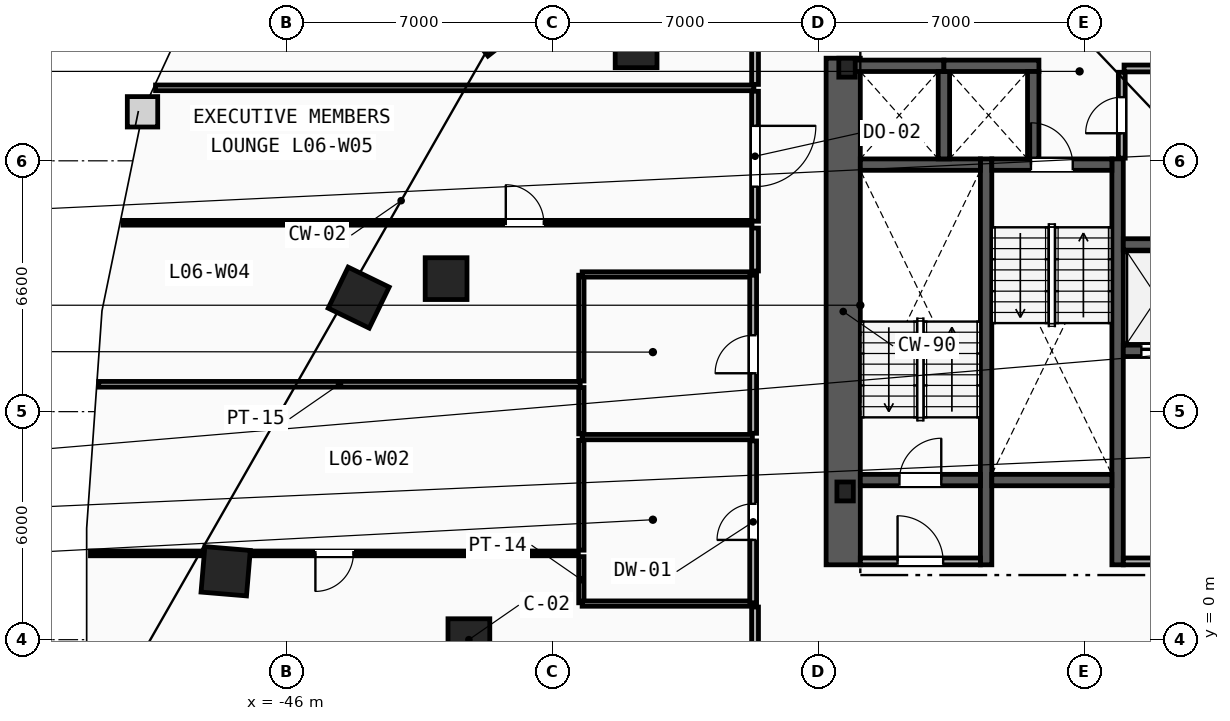
"""IFC4 building model, lengths in metres.
Left out: names, types, materials, properties, quantities, classifications, styles, units other than length and angle.
Written with IfcOpenShell. Run it as: python <this file> out.ifc"""

import sys

from ifc_helpers import new_model, si_unit, direction, frame, frame_2d, origin, origin_2d, place, context, subcontext, project, spatial, rectangle, i_section, extrude, element, fill, save


model = new_model("IFC4")
c1 = context("Model", 3, precision=1e-05, world=origin(), true_north=direction((0.0, 1.0)))
c2 = subcontext(c1, "Body", "Model", "MODEL_VIEW")
j1 = project(units=[si_unit("LENGTHUNIT", "METRE"), si_unit("PLANEANGLEUNIT", "RADIAN")], contexts=[c1])
p1 = place(None, origin())
s1 = spatial("IfcSite", under=j1, at=p1, CompositionType="ELEMENT")
p2 = place(p1, origin())
s2 = spatial("IfcBuilding", under=s1, at=p2, CompositionType="ELEMENT")
p3 = place(p2, frame((0.0, 0.0, 27.8)))
s3 = spatial("IfcBuildingStorey", under=s2, at=p3, CompositionType="ELEMENT", Elevation=27.8)
for number, where, z_axis, x_axis in (
    (1, (-31.3, 3.9, 0.0), (0.0, 0.0, 1.0), (1.0, 0.0, 0.0)),
    (2, (-31.25, 15.05, 0.0), (0.0, 0.0, 1.0), (1.0, 0.0, 0.0)),
):
    element("IfcColumn", number, at=place(p3, frame(where, z_axis=z_axis, x_axis=x_axis)), inside=s3, PredefinedType="COLUMN", context=c2, shape_type="SweptSolid", body=[
        extrude(i_section(OverallWidth=0.432, OverallDepth=0.498, WebThickness=0.056, FlangeThickness=0.089, FilletRadius=0.018, at=origin_2d()), origin(), (0.0, 0.0, 1.0), 3.8),
    ])
for number, where, z_axis, x_axis in (
    (3, (-41.2, 0.0, 0.0), (0.0, 0.0, 1.0), (1.0, 0.0, 0.0)),
    (4, (-41.8, 9.5, 0.0), (0.0, 0.0, 1.0), (1.0, 0.0, 0.0)),
    (5, (-36.8, 15.6, 0.0), (0.0, 0.0, 1.0), (1.0, 0.0, 0.0)),
):
    element("IfcColumn", number, at=place(p3, frame(where, z_axis=z_axis, x_axis=x_axis)), inside=s3, PredefinedType="COLUMN", context=c2, shape_type="SweptSolid", body=[
        extrude(rectangle(XDim=1.1, YDim=1.1, at=origin_2d()), origin(), (0.0, 0.0, 1.0), 3.8),
    ])
for number, where, z_axis, x_axis in (
    (6, (-40.6, 16.2, 0.0), (0.0, 0.0, 1.0), (-0.785, -0.619, 0.0)),
    (7, (-44.1, 9.0, 0.0), (0.0, 0.0, 1.0), (-0.437, -0.899, 0.0)),
    (8, (-47.6, 1.8, 0.0), (0.0, 0.0, 1.0), (-0.084, -0.997, 0.0)),
):
    element("IfcColumn", number, at=place(p3, frame(where, z_axis=z_axis, x_axis=x_axis)), inside=s3, PredefinedType="COLUMN", context=c2, shape_type="SweptSolid", body=[
        extrude(rectangle(XDim=1.2, YDim=1.2, at=origin_2d()), origin(), (0.0, 0.0, 1.0), 3.8),
    ])
p4 = place(p3, frame((-31.35, 1.97, 0.0), z_axis=(0.0, 0.0, 1.0), x_axis=(0.0, 1.0, 0.0)))
e9 = element("IfcWall", 9, at=p4, inside=s3, PredefinedType="SHEAR", context=c2, shape_type="SweptSolid", body=[
    extrude(rectangle(XDim=13.33, YDim=0.9, at=frame_2d((6.665, 0.0))), origin(), (0.0, 0.0, 1.0), 3.5),
])
for number, where, z_axis, x_axis in (
    (10, (-27.59, 1.97, 0.0), (0.0, 0.0, 1.0), (0.0, 1.0, 0.0)),
    (11, (-24.13, 1.97, 0.0), (0.0, 0.0, 1.0), (0.0, 1.0, 0.0)),
):
    element("IfcWall", number, at=place(p3, frame(where, z_axis=z_axis, x_axis=x_axis)), inside=s3, PredefinedType="SHEAR", context=c2, shape_type="SweptSolid", body=[
        extrude(rectangle(XDim=10.68, YDim=0.3, at=frame_2d((5.34, 0.0))), origin(), (0.0, 0.0, 1.0), 3.5),
    ])
p5 = place(p3, frame((-30.9, 4.2, 0.0), z_axis=(0.0, 0.0, 1.0), x_axis=(1.0, 0.0, 0.0)))
e12 = element("IfcWall", 12, at=p5, inside=s3, PredefinedType="SHEAR", context=c2, shape_type="SweptSolid", body=[
    extrude(rectangle(XDim=3.16, YDim=0.3, at=frame_2d((1.58, 0.0))), origin(), (0.0, 0.0, 1.0), 3.5),
])
p6 = place(p5, frame((1.03, 0.0, 0.0)))
e13 = element("IfcOpeningElement", 13, at=p6, cuts=e12, PredefinedType="OPENING", context=c2, shape_type="SweptSolid", body=[
    extrude(rectangle(XDim=1.1, YDim=2.15, at=frame_2d((0.55, 1.075))), frame((0.0, 0.16, 0.0), z_axis=(0.0, -1.0, 0.0), x_axis=(1.0, 0.0, 0.0)), (0.0, 0.0, 1.0), 0.32),
])
p7 = place(p3, frame((-30.9, 12.5, 0.0), z_axis=(0.0, 0.0, 1.0), x_axis=(1.0, 0.0, 0.0)))
e14 = element("IfcWall", 14, at=p7, inside=s3, PredefinedType="SHEAR", context=c2, shape_type="SweptSolid", body=[
    extrude(rectangle(XDim=3.16, YDim=0.3, at=frame_2d((1.58, 0.0))), origin(), (0.0, 0.0, 1.0), 3.5),
])
p8 = place(p3, frame((-27.44, 12.5, 0.0), z_axis=(0.0, 0.0, 1.0), x_axis=(1.0, 0.0, 0.0)))
e15 = element("IfcWall", 15, at=p8, inside=s3, PredefinedType="SHEAR", context=c2, shape_type="SweptSolid", body=[
    extrude(rectangle(XDim=3.16, YDim=0.3, at=frame_2d((1.58, 0.0))), origin(), (0.0, 0.0, 1.0), 3.5),
])
p9 = place(p8, frame((1.03, 0.0, 0.0)))
e16 = element("IfcOpeningElement", 16, at=p9, cuts=e15, PredefinedType="OPENING", context=c2, shape_type="SweptSolid", body=[
    extrude(rectangle(XDim=1.1, YDim=2.15, at=frame_2d((0.55, 1.075))), frame((0.0, 0.16, 0.0), z_axis=(0.0, -1.0, 0.0), x_axis=(1.0, 0.0, 0.0)), (0.0, 0.0, 1.0), 0.32),
])
p10 = place(p3, frame((-27.44, 4.2, 0.0), z_axis=(0.0, 0.0, 1.0), x_axis=(1.0, 0.0, 0.0)))
e17 = element("IfcWall", 17, at=p10, inside=s3, PredefinedType="SHEAR", context=c2, shape_type="SweptSolid", body=[
    extrude(rectangle(XDim=3.16, YDim=0.3, at=frame_2d((1.58, 0.0))), origin(), (0.0, 0.0, 1.0), 3.5),
])
p11 = place(p3, frame((-23.98, 2.06, 0.0), z_axis=(0.0, 0.0, 1.0), x_axis=(1.0, 0.0, 0.0)))
e18 = element("IfcWall", 18, at=p11, inside=s3, PredefinedType="PARTITIONING", context=c2, shape_type="SweptSolid", body=[
    extrude(rectangle(XDim=3.0, YDim=0.18, at=frame_2d((1.5, 0.0))), origin(), (0.0, 0.0, 1.0), 3.5),
])
p12 = place(p11, frame((0.9, 0.0, 0.0)))
e19 = element("IfcOpeningElement", 19, at=p12, cuts=e18, PredefinedType="OPENING", context=c2, shape_type="SweptSolid", body=[
    extrude(rectangle(XDim=1.2, YDim=2.15, at=frame_2d((0.6, 1.075))), frame((0.0, 0.1, 0.0), z_axis=(0.0, -1.0, 0.0), x_axis=(1.0, 0.0, 0.0)), (0.0, 0.0, 1.0), 0.2),
])
p13 = place(p3, frame((-30.9, 2.06, 0.0), z_axis=(0.0, 0.0, 1.0), x_axis=(1.0, 0.0, 0.0)))
e20 = element("IfcWall", 20, at=p13, inside=s3, PredefinedType="PARTITIONING", context=c2, shape_type="SweptSolid", body=[
    extrude(rectangle(XDim=3.16, YDim=0.18, at=frame_2d((1.58, 0.0))), origin(), (0.0, 0.0, 1.0), 3.5),
])
p14 = place(p13, frame((0.98, 0.0, 0.0)))
e21 = element("IfcOpeningElement", 21, at=p14, cuts=e20, PredefinedType="OPENING", context=c2, shape_type="SweptSolid", body=[
    extrude(rectangle(XDim=1.2, YDim=2.15, at=frame_2d((0.6, 1.075))), frame((0.0, 0.1, 0.0), z_axis=(0.0, -1.0, 0.0), x_axis=(1.0, 0.0, 0.0)), (0.0, 0.0, 1.0), 0.2),
])
p15 = place(p3, frame((-23.98, 7.6, 0.0), z_axis=(0.0, 0.0, 1.0), x_axis=(1.0, 0.0, 0.0)))
e22 = element("IfcWall", 22, at=p15, inside=s3, PredefinedType="SHEAR", context=c2, shape_type="SweptSolid", body=[
    extrude(rectangle(XDim=2.1, YDim=0.3, at=frame_2d((1.05, 0.0))), origin(), (0.0, 0.0, 1.0), 3.5),
])
p16 = place(p15, frame((0.475, 0.0, 0.0)))
e23 = element("IfcOpeningElement", 23, at=p16, cuts=e22, PredefinedType="OPENING", context=c2, shape_type="SweptSolid", body=[
    extrude(rectangle(XDim=1.15, YDim=2.2, at=frame_2d((0.575, 1.1))), frame((0.0, 0.16, 0.0), z_axis=(0.0, -1.0, 0.0), x_axis=(1.0, 0.0, 0.0)), (0.0, 0.0, 1.0), 0.32),
])
p17 = place(p3, frame((-23.98, 10.4, 0.0), z_axis=(0.0, 0.0, 1.0), x_axis=(1.0, 0.0, 0.0)))
e24 = element("IfcWall", 24, at=p17, inside=s3, PredefinedType="SHEAR", context=c2, shape_type="SweptSolid", body=[
    extrude(rectangle(XDim=2.1, YDim=0.3, at=frame_2d((1.05, 0.0))), origin(), (0.0, 0.0, 1.0), 3.5),
])
p18 = place(p3, frame((-31.2, 15.1, 0.0), z_axis=(0.0, 0.0, 1.0), x_axis=(1.0, 0.0, 0.0)))
e25 = element("IfcWall", 25, at=p18, inside=s3, PredefinedType="SHEAR", context=c2, shape_type="SweptSolid", body=[
    extrude(rectangle(XDim=2.5, YDim=0.3, at=frame_2d((1.25, 0.0))), origin(), (0.0, 0.0, 1.0), 3.5),
])
p19 = place(p3, frame((-28.7, 12.65, 0.0), z_axis=(0.0, 0.0, 1.0), x_axis=(0.0, 1.0, 0.0)))
e26 = element("IfcWall", 26, at=p19, inside=s3, PredefinedType="SHEAR", context=c2, shape_type="SweptSolid", body=[
    extrude(rectangle(XDim=2.3, YDim=0.3, at=frame_2d((1.15, 0.0))), origin(), (0.0, 0.0, 1.0), 3.5),
])
p20 = place(p3, frame((-28.7, 15.1, 0.0), z_axis=(0.0, 0.0, 1.0), x_axis=(1.0, 0.0, 0.0)))
e27 = element("IfcWall", 27, at=p20, inside=s3, PredefinedType="SHEAR", context=c2, shape_type="SweptSolid", body=[
    extrude(rectangle(XDim=2.5, YDim=0.3, at=frame_2d((1.25, 0.0))), origin(), (0.0, 0.0, 1.0), 3.5),
])
p21 = place(p3, frame((-26.35, 12.65, 0.0), z_axis=(0.0, 0.0, 1.0), x_axis=(0.0, 1.0, 0.0)))
e28 = element("IfcWall", 28, at=p21, inside=s3, PredefinedType="SHEAR", context=c2, shape_type="SweptSolid", body=[
    extrude(rectangle(XDim=2.3, YDim=0.3, at=frame_2d((1.15, 0.0))), origin(), (0.0, 0.0, 1.0), 3.5),
])
p22 = place(p3, frame((-23.96, 15.03, 0.0), z_axis=(0.0, 0.0, 1.0), x_axis=(1.0, 0.0, 0.0)))
e29 = element("IfcWall", 29, at=p22, inside=s3, PredefinedType="PARTITIONING", context=c2, shape_type="SweptSolid", body=[
    extrude(rectangle(XDim=2.61, YDim=0.18, at=frame_2d((1.305, 0.0))), origin(), (0.0, 0.0, 1.0), 2.573),
])
p23 = place(p3, frame((-24.02, 12.67, 0.0), z_axis=(0.0, 0.0, 1.0), x_axis=(0.0, 1.0, 0.0)))
e30 = element("IfcWall", 30, at=p23, inside=s3, PredefinedType="PARTITIONING", context=c2, shape_type="SweptSolid", body=[
    extrude(rectangle(XDim=2.26, YDim=0.18, at=frame_2d((1.13, 0.0))), origin(), (0.0, 0.0, 1.0), 3.5),
])
p24 = place(p23, frame((0.655, 0.0, 0.0)))
e31 = element("IfcOpeningElement", 31, at=p24, cuts=e30, PredefinedType="OPENING", context=c2, shape_type="SweptSolid", body=[
    extrude(rectangle(XDim=0.95, YDim=2.1, at=frame_2d((0.475, 1.05))), frame((0.0, 0.1, 0.0), z_axis=(0.0, -1.0, 0.0), x_axis=(1.0, 0.0, 0.0)), (0.0, 0.0, 1.0), 0.2),
])
p25 = place(p3, frame((-38.24, 0.97, 0.0), z_axis=(0.0, 0.0, 1.0), x_axis=(0.0, 1.0, 0.0)))
e32 = element("IfcWall", 32, at=p25, inside=s3, PredefinedType="PARTITIONING", context=c2, shape_type="SweptSolid", body=[
    extrude(rectangle(XDim=1.215, YDim=0.14, at=frame_2d((0.607, 0.0))), origin(), (0.0, 0.0, 1.0), 3.5),
])
p26 = place(p3, frame((-38.24, 2.355, 0.0), z_axis=(0.0, 0.0, 1.0), x_axis=(0.0, 1.0, 0.0)))
e33 = element("IfcWall", 33, at=p26, inside=s3, PredefinedType="PARTITIONING", context=c2, shape_type="SweptSolid", body=[
    extrude(rectangle(XDim=2.89, YDim=0.14, at=frame_2d((1.445, 0.0))), origin(), (0.0, 0.0, 1.0), 3.5),
])
p27 = place(p3, frame((-38.24, 5.415, 0.0), z_axis=(0.0, 0.0, 1.0), x_axis=(0.0, 1.0, 0.0)))
e34 = element("IfcWall", 34, at=p27, inside=s3, PredefinedType="PARTITIONING", context=c2, shape_type="SweptSolid", body=[
    extrude(rectangle(XDim=1.22, YDim=0.14, at=frame_2d((0.61, 0.0))), origin(), (0.0, 0.0, 1.0), 3.5),
])
p28 = place(p3, frame((-38.24, 6.805, 0.0), z_axis=(0.0, 0.0, 1.0), x_axis=(0.0, 1.0, 0.0)))
e35 = element("IfcWall", 35, at=p28, inside=s3, PredefinedType="PARTITIONING", context=c2, shape_type="SweptSolid", body=[
    extrude(rectangle(XDim=2.785, YDim=0.14, at=frame_2d((1.393, 0.0))), origin(), (0.0, 0.0, 1.0), 3.5),
])
for number, where, z_axis, x_axis in (
    (36, (-38.22, 0.95, 0.0), (0.0, 0.0, 1.0), (1.0, 0.0, 0.0)),
    (37, (-38.22, 5.33, 0.0), (0.0, 0.0, 1.0), (1.0, 0.0, 0.0)),
    (38, (-38.22, 9.61, 0.0), (0.0, 0.0, 1.0), (1.0, 0.0, 0.0)),
):
    element("IfcWall", number, at=place(p3, frame(where, z_axis=z_axis, x_axis=x_axis)), inside=s3, PredefinedType="PARTITIONING", context=c2, shape_type="SweptSolid", body=[
        extrude(rectangle(XDim=4.48, YDim=0.14, at=frame_2d((2.24, 0.0))), origin(), (0.0, 0.0, 1.0), 3.5),
    ])
p29 = place(p3, frame((-33.72, 0.97, 0.0), z_axis=(0.0, 0.0, 1.0), x_axis=(0.0, 1.0, 0.0)))
e39 = element("IfcWall", 39, at=p29, inside=s3, PredefinedType="PARTITIONING", context=c2, shape_type="SweptSolid", body=[
    extrude(rectangle(XDim=4.26, YDim=0.18, at=frame_2d((2.13, 0.0))), origin(), (0.0, 0.0, 1.0), 3.5),
])
p30 = place(p29, frame((1.655, 0.0, 0.0)))
e40 = element("IfcOpeningElement", 40, at=p30, cuts=e39, PredefinedType="OPENING", context=c2, shape_type="SweptSolid", body=[
    extrude(rectangle(XDim=0.95, YDim=2.1, at=frame_2d((0.475, 1.05))), frame((0.0, 0.1, 0.0), z_axis=(0.0, -1.0, 0.0), x_axis=(1.0, 0.0, 0.0)), (0.0, 0.0, 1.0), 0.2),
])
p31 = place(p3, frame((-33.72, 5.43, 0.0), z_axis=(0.0, 0.0, 1.0), x_axis=(0.0, 1.0, 0.0)))
e41 = element("IfcWall", 41, at=p31, inside=s3, PredefinedType="PARTITIONING", context=c2, shape_type="SweptSolid", body=[
    extrude(rectangle(XDim=4.16, YDim=0.18, at=frame_2d((2.08, 0.0))), origin(), (0.0, 0.0, 1.0), 3.5),
])
p32 = place(p31, frame((1.58, 0.0, 0.0)))
e42 = element("IfcOpeningElement", 42, at=p32, cuts=e41, PredefinedType="OPENING", context=c2, shape_type="SweptSolid", body=[
    extrude(rectangle(XDim=1.0, YDim=2.15, at=frame_2d((0.5, 1.075))), frame((0.0, 0.1, 0.0), z_axis=(0.0, -1.0, 0.0), x_axis=(1.0, 0.0, 0.0)), (0.0, 0.0, 1.0), 0.2),
])
p33 = place(p3, frame((-50.941, 6.72, 0.0), z_axis=(0.0, 0.0, 1.0), x_axis=(1.0, 0.0, 0.0)))
e43 = element("IfcWall", 43, at=p33, inside=s3, PredefinedType="PARTITIONING", context=c2, shape_type="SweptSolid", body=[
    extrude(rectangle(XDim=12.671, YDim=0.15, at=frame_2d((6.335, 0.0))), origin(), (0.0, 0.0, 1.0), 3.5),
])
p34 = place(p3, frame((-49.445, 14.52, 0.0), z_axis=(0.0, 0.0, 1.0), x_axis=(1.0, 0.0, 0.0)))
e44 = element("IfcWall", 44, at=p34, inside=s3, PredefinedType="PARTITIONING", context=c2, shape_type="SweptSolid", body=[
    extrude(rectangle(XDim=15.745, YDim=0.15, at=frame_2d((7.873, 0.0))), origin(), (0.0, 0.0, 1.0), 3.5),
])
p35 = place(p3, frame((-33.67, 0.859, 0.0), z_axis=(0.0, 0.0, 1.0), x_axis=(0.0, -1.0, 0.0)))
e45 = element("IfcWall", 45, at=p35, inside=s3, PredefinedType="PARTITIONING", context=c2, shape_type="SweptSolid", body=[
    extrude(rectangle(XDim=12.259, YDim=0.18, at=frame_2d((6.129, 0.0))), origin(), (0.0, 0.0, 1.0), 3.5),
])
p36 = place(p3, frame((-33.67, 17.428, 0.0), z_axis=(0.0, 0.0, 1.0), x_axis=(0.0, -1.0, 0.0)))
e46 = element("IfcWall", 46, at=p36, inside=s3, PredefinedType="PARTITIONING", context=c2, shape_type="SweptSolid", body=[
    extrude(rectangle(XDim=2.818, YDim=0.18, at=frame_2d((1.409, 0.0))), origin(), (0.0, 0.0, 1.0), 3.5),
])
p37 = place(p3, frame((-33.67, 10.83, 0.0), z_axis=(0.0, 0.0, 1.0), x_axis=(0.0, -1.0, 0.0)))
e47 = element("IfcWall", 47, at=p37, inside=s3, PredefinedType="PARTITIONING", context=c2, shape_type="SweptSolid", body=[
    extrude(rectangle(XDim=1.129, YDim=0.18, at=frame_2d((0.564, 0.0))), origin(), (0.0, 0.0, 1.0), 3.5),
])
p38 = place(p3, frame((-33.67, 14.43, 0.0), z_axis=(0.0, 0.0, 1.0), x_axis=(0.0, -1.0, 0.0)))
e48 = element("IfcWall", 48, at=p38, inside=s3, PredefinedType="PARTITIONING", context=c2, shape_type="SweptSolid", body=[
    extrude(rectangle(XDim=3.42, YDim=0.18, at=frame_2d((1.71, 0.0))), origin(), (0.0, 0.0, 1.0), 3.5),
])
p39 = place(p38, frame((0.91, 0.0, 0.0)))
e49 = element("IfcOpeningElement", 49, at=p39, cuts=e48, PredefinedType="OPENING", context=c2, shape_type="SweptSolid", body=[
    extrude(rectangle(XDim=1.6, YDim=2.2, at=frame_2d((0.8, 1.1))), frame((0.0, 0.1, 0.0), z_axis=(0.0, -1.0, 0.0), x_axis=(1.0, 0.0, 0.0)), (0.0, 0.0, 1.0), 0.2),
])
p40 = place(p3, frame((-38.32, 2.27, 0.0), z_axis=(0.0, 0.0, 1.0), x_axis=(-1.0, 0.0, 0.0)))
e50 = element("IfcWall", 50, at=p40, inside=s3, PredefinedType="PARTITIONING", context=c2, shape_type="SweptSolid", body=[
    extrude(rectangle(XDim=12.838, YDim=0.125, at=frame_2d((6.419, 0.0))), origin(), (0.0, 0.0, 1.0), 3.5),
])
p41 = place(p40, frame((5.919, 0.0, 0.0)))
e51 = element("IfcOpeningElement", 51, at=p41, cuts=e50, PredefinedType="OPENING", context=c2, shape_type="SweptSolid", body=[
    extrude(rectangle(XDim=1.0, YDim=2.15, at=frame_2d((0.5, 1.075))), frame((0.0, 0.073, 0.0), z_axis=(0.0, -1.0, 0.0), x_axis=(1.0, 0.0, 0.0)), (0.0, 0.0, 1.0), 0.145),
])
p42 = place(p3, frame((-50.302, 10.97, 0.0), z_axis=(0.0, 0.0, 1.0), x_axis=(1.0, 0.0, 0.0)))
e52 = element("IfcWall", 52, at=p42, inside=s3, PredefinedType="PARTITIONING", context=c2, shape_type="SweptSolid", body=[
    extrude(rectangle(XDim=16.552, YDim=0.125, at=frame_2d((8.276, 0.0))), origin(), (0.0, 0.0, 1.0), 3.5),
])
p43 = place(p42, frame((10.073, 0.0, 0.0)))
e53 = element("IfcOpeningElement", 53, at=p43, cuts=e52, PredefinedType="OPENING", context=c2, shape_type="SweptSolid", body=[
    extrude(rectangle(XDim=1.0, YDim=2.15, at=frame_2d((0.5, 1.075))), frame((0.0, 0.073, 0.0), z_axis=(0.0, -1.0, 0.0), x_axis=(1.0, 0.0, 0.0)), (0.0, 0.0, 1.0), 0.145),
])
p44 = place(p6, origin())
e54 = element("IfcDoor", 54, at=p44, inside=s3, OperationType="SINGLE_SWING_RIGHT", PredefinedType="DOOR", context=c2, shape_type="SweptSolid", body=[
    extrude(rectangle(XDim=1.1, YDim=2.15, at=frame_2d((0.55, 1.075))), frame((0.0, 0.025, 0.0), z_axis=(0.0, -1.0, 0.0), x_axis=(1.0, 0.0, 0.0)), (0.0, 0.0, 1.0), 0.05),
])
fill(e13, e54)
p45 = place(p9, origin())
e55 = element("IfcDoor", 55, at=p45, inside=s3, OperationType="SINGLE_SWING_LEFT", PredefinedType="DOOR", context=c2, shape_type="SweptSolid", body=[
    extrude(rectangle(XDim=1.1, YDim=2.15, at=frame_2d((0.55, 1.075))), frame((0.0, 0.025, 0.0), z_axis=(0.0, -1.0, 0.0), x_axis=(1.0, 0.0, 0.0)), (0.0, 0.0, 1.0), 0.05),
])
fill(e16, e55)
p46 = place(p14, origin())
e56 = element("IfcDoor", 56, at=p46, inside=s3, OperationType="SINGLE_SWING_LEFT", PredefinedType="DOOR", context=c2, shape_type="SweptSolid", body=[
    extrude(rectangle(XDim=1.2, YDim=2.15, at=frame_2d((0.6, 1.075))), frame((0.0, 0.025, 0.0), z_axis=(0.0, -1.0, 0.0), x_axis=(1.0, 0.0, 0.0)), (0.0, 0.0, 1.0), 0.05),
])
fill(e21, e56)
p47 = place(p16, origin())
e57 = element("IfcDoor", 57, at=p47, inside=s3, OperationType="SLIDING_TO_LEFT", PredefinedType="TRAPDOOR", context=c2, shape_type="SweptSolid", body=[
    extrude(rectangle(XDim=1.15, YDim=2.2, at=frame_2d((0.575, 1.1))), frame((0.0, 0.025, 0.0), z_axis=(0.0, -1.0, 0.0), x_axis=(1.0, 0.0, 0.0)), (0.0, 0.0, 1.0), 0.05),
])
fill(e23, e57)
p48 = place(p43, origin())
e58 = element("IfcDoor", 58, at=p48, inside=s3, OperationType="SINGLE_SWING_LEFT", PredefinedType="DOOR", context=c2, shape_type="SweptSolid", body=[
    extrude(rectangle(XDim=1.0, YDim=2.15, at=frame_2d((0.5, 1.075))), frame((0.0, 0.025, 0.0), z_axis=(0.0, -1.0, 0.0), x_axis=(1.0, 0.0, 0.0)), (0.0, 0.0, 1.0), 0.05),
])
fill(e53, e58)
p49 = place(p41, origin())
e59 = element("IfcDoor", 59, at=p49, inside=s3, OperationType="SINGLE_SWING_RIGHT", PredefinedType="DOOR", context=c2, shape_type="SweptSolid", body=[
    extrude(rectangle(XDim=1.0, YDim=2.15, at=frame_2d((0.5, 1.075))), frame((0.0, 0.025, 0.0), z_axis=(0.0, -1.0, 0.0), x_axis=(1.0, 0.0, 0.0)), (0.0, 0.0, 1.0), 0.05),
])
fill(e51, e59)
p50 = place(p30, origin())
e60 = element("IfcDoor", 60, at=p50, inside=s3, OperationType="SINGLE_SWING_LEFT", PredefinedType="DOOR", context=c2, shape_type="SweptSolid", body=[
    extrude(rectangle(XDim=0.95, YDim=2.1, at=frame_2d((0.475, 1.05))), frame((0.0, 0.025, 0.0), z_axis=(0.0, -1.0, 0.0), x_axis=(1.0, 0.0, 0.0)), (0.0, 0.0, 1.0), 0.05),
])
fill(e40, e60)
p51 = place(p32, origin())
e61 = element("IfcDoor", 61, at=p51, inside=s3, OperationType="SINGLE_SWING_LEFT", PredefinedType="DOOR", context=c2, shape_type="SweptSolid", body=[
    extrude(rectangle(XDim=1.0, YDim=2.15, at=frame_2d((0.5, 1.075))), frame((0.0, 0.025, 0.0), z_axis=(0.0, -1.0, 0.0), x_axis=(1.0, 0.0, 0.0)), (0.0, 0.0, 1.0), 0.05),
])
fill(e42, e61)
p52 = place(p39, origin())
e62 = element("IfcDoor", 62, at=p52, inside=s3, OperationType="SINGLE_SWING_LEFT", PredefinedType="DOOR", context=c2, shape_type="SweptSolid", body=[
    extrude(rectangle(XDim=1.6, YDim=2.2, at=frame_2d((0.8, 1.1))), frame((0.0, 0.025, 0.0), z_axis=(0.0, -1.0, 0.0), x_axis=(1.0, 0.0, 0.0)), (0.0, 0.0, 1.0), 0.05),
])
fill(e49, e62)
p53 = place(p24, origin())
e63 = element("IfcDoor", 63, at=p53, inside=s3, OperationType="SINGLE_SWING_LEFT", PredefinedType="DOOR", context=c2, shape_type="SweptSolid", body=[
    extrude(rectangle(XDim=0.95, YDim=2.1, at=frame_2d((0.475, 1.05))), frame((0.0, 0.025, 0.0), z_axis=(0.0, -1.0, 0.0), x_axis=(1.0, 0.0, 0.0)), (0.0, 0.0, 1.0), 0.05),
])
fill(e31, e63)
save(model, sys.argv[1])
